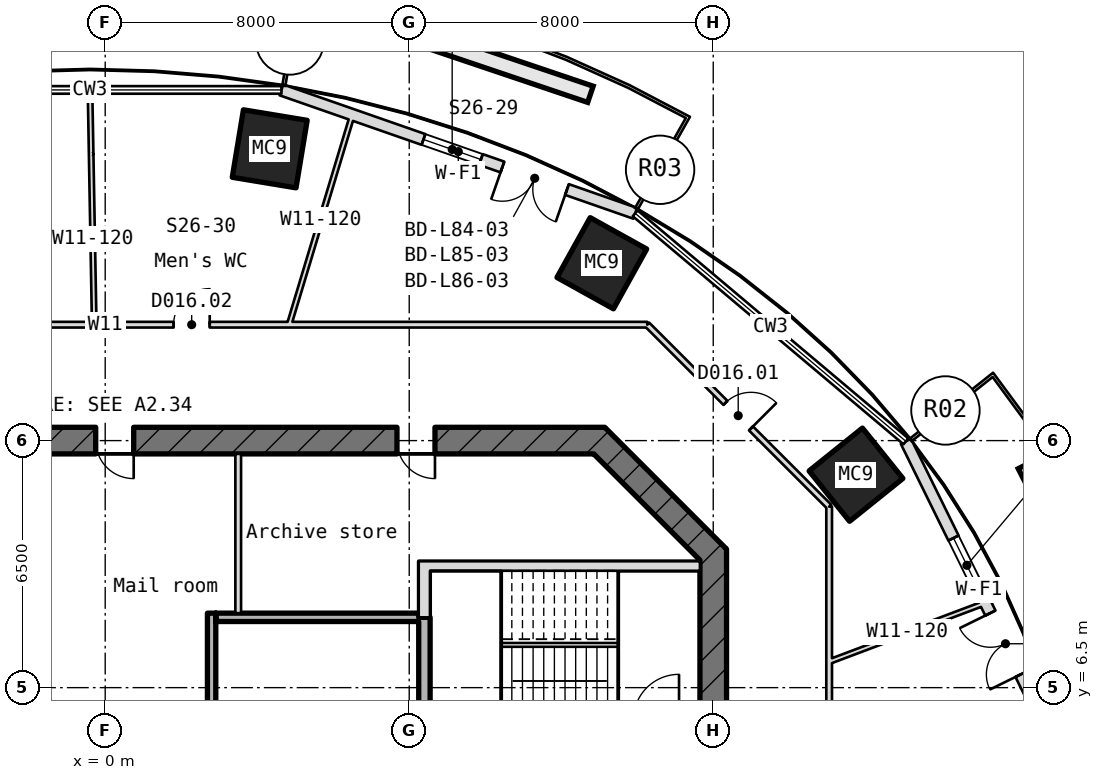
"""IFC4 building model, lengths in metres.
Left out: names, types, materials, properties, quantities, classifications, styles, units other than length and angle.
Written with IfcOpenShell. Run it as: python <this file> out.ifc"""

import sys

from ifc_helpers import new_model, si_unit, direction, frame, frame_2d, origin, origin_2d, place, context, subcontext, project, spatial, rectangle, hollow_rectangle, extrude, element, fill, save


model = new_model("IFC4")
c1 = context("Model", 3, precision=1e-05, world=origin(), true_north=direction((0.0, 1.0)))
c2 = subcontext(c1, "Body", "Model", "MODEL_VIEW")
j1 = project(units=[si_unit("LENGTHUNIT", "METRE"), si_unit("PLANEANGLEUNIT", "RADIAN")], contexts=[c1])
p1 = place(None, origin())
s1 = spatial("IfcSite", under=j1, at=p1, CompositionType="ELEMENT")
p2 = place(p1, origin())
s2 = spatial("IfcBuilding", under=s1, at=p2, CompositionType="ELEMENT")
p3 = place(p2, frame((0.0, 0.0, 371.65)))
s3 = spatial("IfcBuildingStorey", under=s2, at=p3, CompositionType="ELEMENT", Elevation=371.65)
for number, where, z_axis, x_axis in (
    (1, (19.757, 12.103, -0.18), (0.0, 0.0, 1.0), (0.626, -0.78, 0.0)),
    (2, (13.068, 17.667, -0.18), (0.0, 0.0, 1.0), (0.874, -0.486, 0.0)),
    (3, (4.329, 20.677, -0.18), (0.0, 0.0, 1.0), (0.987, -0.163, 0.0)),
):
    element("IfcColumn", number, at=place(p3, frame(where, z_axis=z_axis, x_axis=x_axis)), inside=s3, PredefinedType="COLUMN", context=c2, shape_type="SweptSolid", body=[
        extrude(hollow_rectangle(XDim=1.7, YDim=1.8, WallThickness=0.05, at=origin_2d()), origin(), (0.0, 0.0, 1.0), 4.15),
    ])
p4 = place(p3, frame((24.926, 5.142, 0.0), z_axis=(0.0, 0.0, 1.0), x_axis=(-0.441346217757, 0.897336902212, 0.0)))
e4 = element("IfcWall", 4, at=p4, inside=s3, PredefinedType="SOLIDWALL", context=c2, shape_type="SweptSolid", body=[
    extrude(rectangle(XDim=8.736, YDim=0.3, at=frame_2d((4.368, 0.0))), origin(), (0.0, 0.0, 1.0), 3.97),
])
p5 = place(p4, frame((1.9, 0.0, 0.0)))
e5 = element("IfcOpeningElement", 5, at=p5, cuts=e4, PredefinedType="OPENING", context=c2, shape_type="SweptSolid", body=[
    extrude(rectangle(XDim=1.8, YDim=2.4, at=frame_2d((0.9, 1.2))), frame((0.0, 0.16, 0.0), z_axis=(0.0, -1.0, 0.0), x_axis=(1.0, 0.0, 0.0)), (0.0, 0.0, 1.0), 0.32),
])
p6 = place(p4, frame((4.3, 0.0, 0.9)))
e6 = element("IfcOpeningElement", 6, at=p6, cuts=e4, PredefinedType="OPENING", context=c2, shape_type="SweptSolid", body=[
    extrude(rectangle(XDim=1.6, YDim=1.5, at=frame_2d((0.8, 0.75))), frame((0.0, 0.16, 0.0), z_axis=(0.0, -1.0, 0.0), x_axis=(1.0, 0.0, 0.0)), (0.0, 0.0, 1.0), 0.32),
])
p7 = place(p3, frame((13.946, 18.98, 0.0), z_axis=(0.0, 0.0, 1.0), x_axis=(-0.944198390312, 0.329377290855, 0.0)))
e7 = element("IfcWall", 7, at=p7, inside=s3, PredefinedType="SOLIDWALL", context=c2, shape_type="SweptSolid", body=[
    extrude(rectangle(XDim=9.858, YDim=0.3, at=frame_2d((4.929, 0.0))), origin(), (0.0, 0.0, 1.0), 3.97),
])
p8 = place(p7, frame((1.9, 0.0, 0.0)))
e8 = element("IfcOpeningElement", 8, at=p8, cuts=e7, PredefinedType="OPENING", context=c2, shape_type="SweptSolid", body=[
    extrude(rectangle(XDim=1.8, YDim=2.4, at=frame_2d((0.9, 1.2))), frame((0.0, 0.16, 0.0), z_axis=(0.0, -1.0, 0.0), x_axis=(1.0, 0.0, 0.0)), (0.0, 0.0, 1.0), 0.32),
])
p9 = place(p7, frame((4.3, 0.0, 0.9)))
e9 = element("IfcOpeningElement", 9, at=p9, cuts=e7, PredefinedType="OPENING", context=c2, shape_type="SweptSolid", body=[
    extrude(rectangle(XDim=1.6, YDim=1.5, at=frame_2d((0.8, 0.75))), frame((0.0, 0.16, 0.0), z_axis=(0.0, -1.0, 0.0), x_axis=(1.0, 0.0, 0.0)), (0.0, 0.0, 1.0), 0.32),
])
p10 = place(p3, frame((16.0, -10.145, -0.18), z_axis=(0.0, 0.0, 1.0), x_axis=(0.0, 1.0, 0.0)))
e10 = element("IfcWall", 10, at=p10, inside=s3, PredefinedType="SHEAR", context=c2, shape_type="SweptSolid", body=[
    extrude(rectangle(XDim=20.29, YDim=0.7, at=frame_2d((10.145, 0.0))), origin(), (0.0, 0.0, 1.0), 4.15),
])
p11 = place(p10, frame((8.945, 0.0, 0.18)))
e11 = element("IfcOpeningElement", 11, at=p11, cuts=e10, PredefinedType="OPENING", context=c2, shape_type="SweptSolid", body=[
    extrude(rectangle(XDim=2.4, YDim=2.1, at=frame_2d((1.2, 1.05))), frame((0.0, 0.36, 0.0), z_axis=(0.0, -1.0, 0.0), x_axis=(1.0, 0.0, 0.0)), (0.0, 0.0, 1.0), 0.72),
])
p12 = place(p10, frame((13.545, 0.0, 0.18)))
e12 = element("IfcOpeningElement", 12, at=p12, cuts=e10, PredefinedType="OPENING", context=c2, shape_type="SweptSolid", body=[
    extrude(rectangle(XDim=1.2, YDim=2.1, at=frame_2d((0.6, 1.05))), frame((0.0, 0.36, 0.0), z_axis=(0.0, -1.0, 0.0), x_axis=(1.0, 0.0, 0.0)), (0.0, 0.0, 1.0), 0.72),
])
p13 = place(p10, frame((3.545, 0.0, 0.18)))
e13 = element("IfcOpeningElement", 13, at=p13, cuts=e10, PredefinedType="OPENING", context=c2, shape_type="SweptSolid", body=[
    extrude(rectangle(XDim=1.2, YDim=2.1, at=frame_2d((0.6, 1.05))), frame((0.0, 0.36, 0.0), z_axis=(0.0, -1.0, 0.0), x_axis=(1.0, 0.0, 0.0)), (0.0, 0.0, 1.0), 0.72),
])
p14 = place(p3, frame((16.103, 9.897, -0.18), z_axis=(0.0, 0.0, 1.0), x_axis=(-0.707106781187, 0.707106781187, 0.0)))
e14 = element("IfcWall", 14, at=p14, inside=s3, PredefinedType="SHEAR", context=c2, shape_type="SweptSolid", body=[
    extrude(rectangle(XDim=4.533, YDim=0.7, at=frame_2d((2.266, 0.0))), origin(), (0.0, 0.0, 1.0), 4.15),
])
p15 = place(p3, frame((13.145, 13.0, -0.18), z_axis=(0.0, 0.0, 1.0), x_axis=(-1.0, 0.0, 0.0)))
e15 = element("IfcWall", 15, at=p15, inside=s3, PredefinedType="SHEAR", context=c2, shape_type="SweptSolid", body=[
    extrude(rectangle(XDim=26.29, YDim=0.7, at=frame_2d((13.145, 0.0))), origin(), (0.0, 0.0, 1.0), 4.15),
])
p16 = place(p15, frame((22.89, 0.0, 0.18)))
e16 = element("IfcOpeningElement", 16, at=p16, cuts=e15, PredefinedType="OPENING", context=c2, shape_type="SweptSolid", body=[
    extrude(rectangle(XDim=1.0, YDim=2.1, at=frame_2d((0.5, 1.05))), frame((0.0, 0.36, 0.0), z_axis=(0.0, -1.0, 0.0), x_axis=(1.0, 0.0, 0.0)), (0.0, 0.0, 1.0), 0.72),
])
p17 = place(p15, frame((18.895, 0.0, 0.18)))
e17 = element("IfcOpeningElement", 17, at=p17, cuts=e15, PredefinedType="OPENING", context=c2, shape_type="SweptSolid", body=[
    extrude(rectangle(XDim=1.0, YDim=2.1, at=frame_2d((0.5, 1.05))), frame((0.0, 0.36, 0.0), z_axis=(0.0, -1.0, 0.0), x_axis=(1.0, 0.0, 0.0)), (0.0, 0.0, 1.0), 0.72),
])
p18 = place(p15, frame((12.395, 0.0, 0.18)))
e18 = element("IfcOpeningElement", 18, at=p18, cuts=e15, PredefinedType="OPENING", context=c2, shape_type="SweptSolid", body=[
    extrude(rectangle(XDim=1.0, YDim=2.1, at=frame_2d((0.5, 1.05))), frame((0.0, 0.36, 0.0), z_axis=(0.0, -1.0, 0.0), x_axis=(1.0, 0.0, 0.0)), (0.0, 0.0, 1.0), 0.72),
])
p19 = place(p15, frame((4.467, 0.0, 0.18)))
e19 = element("IfcOpeningElement", 19, at=p19, cuts=e15, PredefinedType="OPENING", context=c2, shape_type="SweptSolid", body=[
    extrude(rectangle(XDim=1.0, YDim=2.1, at=frame_2d((0.5, 1.05))), frame((0.0, 0.36, 0.0), z_axis=(0.0, -1.0, 0.0), x_axis=(1.0, 0.0, 0.0)), (0.0, 0.0, 1.0), 0.72),
])
p20 = place(p3, frame((2.91, 8.35, 0.0), z_axis=(0.0, 0.0, 1.0), x_axis=(1.0, 0.0, 0.0)))
e20 = element("IfcWall", 20, at=p20, inside=s3, PredefinedType="STANDARD", context=c2, shape_type="SweptSolid", body=[
    extrude(rectangle(XDim=5.34, YDim=0.22, at=frame_2d((2.67, 0.0))), origin(), (0.0, 0.0, 1.0), 3.97),
])
p21 = place(p3, frame((8.55, 9.7, -0.18), z_axis=(0.0, 0.0, 1.0), x_axis=(1.0, 0.0, 0.0)))
e21 = element("IfcWall", 21, at=p21, inside=s3, PredefinedType="SHEAR", context=c2, shape_type="SweptSolid", body=[
    extrude(rectangle(XDim=7.1, YDim=0.25, at=frame_2d((3.55, 0.0))), origin(), (0.0, 0.0, 1.0), 4.15),
])
p22 = place(p3, frame((2.8, 5.46, 0.0), z_axis=(0.0, 0.0, 1.0), x_axis=(0.0, 1.0, 0.0)))
e22 = element("IfcWall", 22, at=p22, inside=s3, PredefinedType="STANDARD", context=c2, shape_type="SweptSolid", body=[
    extrude(rectangle(XDim=3.0, YDim=0.22, at=frame_2d((1.5, 0.0))), origin(), (0.0, 0.0, 1.0), 3.97),
])
p23 = place(p3, frame((3.5, 8.46, 0.0), z_axis=(0.0, 0.0, 1.0), x_axis=(0.0, 1.0, 0.0)))
e23 = element("IfcWall", 23, at=p23, inside=s3, PredefinedType="PARTITIONING", context=c2, shape_type="SweptSolid", body=[
    extrude(rectangle(XDim=4.19, YDim=0.15, at=frame_2d((2.095, 0.0))), origin(), (0.0, 0.0, 1.0), 3.97),
])
p24 = place(p3, frame((8.4, 2.5, -0.18), z_axis=(0.0, 0.0, 1.0), x_axis=(0.0, 1.0, 0.0)))
e24 = element("IfcWall", 24, at=p24, inside=s3, PredefinedType="SHEAR", context=c2, shape_type="SweptSolid", body=[
    extrude(rectangle(XDim=5.85, YDim=0.3, at=frame_2d((2.925, 0.0))), origin(), (0.0, 0.0, 1.0), 4.15),
])
p25 = place(p3, frame((8.4, 8.35, -0.18), z_axis=(0.0, 0.0, 1.0), x_axis=(0.0, 1.0, 0.0)))
e25 = element("IfcWall", 25, at=p25, inside=s3, PredefinedType="SHEAR", context=c2, shape_type="SweptSolid", body=[
    extrude(rectangle(XDim=1.475, YDim=0.3, at=frame_2d((0.737, 0.0))), origin(), (0.0, 0.0, 1.0), 4.15),
])
p26 = place(p3, frame((-14.263, 16.05, 0.0), z_axis=(0.0, 0.0, 1.0), x_axis=(1.0, 0.0, 0.0)))
e26 = element("IfcWall", 26, at=p26, inside=s3, PredefinedType="PARTITIONING", context=c2, shape_type="SweptSolid", body=[
    extrude(rectangle(XDim=28.527, YDim=0.15, at=frame_2d((14.263, 0.0))), origin(), (0.0, 0.0, 1.0), 3.97),
])
p27 = place(p26, frame((16.064, 0.0, 0.0)))
e27 = element("IfcOpeningElement", 27, at=p27, cuts=e26, PredefinedType="OPENING", context=c2, shape_type="SweptSolid", body=[
    extrude(rectangle(XDim=0.95, YDim=2.1, at=frame_2d((0.475, 1.05))), frame((0.0, 0.085, 0.0), z_axis=(0.0, -1.0, 0.0), x_axis=(1.0, 0.0, 0.0)), (0.0, 0.0, 1.0), 0.17),
])
p28 = place(p26, frame((10.107, 0.0, 0.0)))
e28 = element("IfcOpeningElement", 28, at=p28, cuts=e26, PredefinedType="OPENING", context=c2, shape_type="SweptSolid", body=[
    extrude(rectangle(XDim=0.95, YDim=2.1, at=frame_2d((0.475, 1.05))), frame((0.0, 0.085, 0.0), z_axis=(0.0, -1.0, 0.0), x_axis=(1.0, 0.0, 0.0)), (0.0, 0.0, 1.0), 0.17),
])
p29 = place(p26, frame((4.988, 0.0, 0.0)))
e29 = element("IfcOpeningElement", 29, at=p29, cuts=e26, PredefinedType="OPENING", context=c2, shape_type="SweptSolid", body=[
    extrude(rectangle(XDim=0.95, YDim=2.1, at=frame_2d((0.475, 1.05))), frame((0.0, 0.085, 0.0), z_axis=(0.0, -1.0, 0.0), x_axis=(1.0, 0.0, 0.0)), (0.0, 0.0, 1.0), 0.17),
])
p30 = place(p3, frame((-0.289, 16.05, 0.0), z_axis=(0.0, 0.0, 1.0), x_axis=(-0.01800089031, 0.999837970847, 0.0)))
e30 = element("IfcWall", 30, at=p30, inside=s3, PredefinedType="PARTITIONING", context=c2, shape_type="SweptSolid", body=[
    extrude(rectangle(XDim=4.489, YDim=0.12, at=frame_2d((2.245, 0.0))), origin(), (0.0, 0.0, 1.0), 3.617),
])
p31 = place(p3, frame((-0.37, 20.539, 0.0), z_axis=(0.0, 0.0, 1.0), x_axis=(-0.017923967001, 0.9998393528, 0.0)))
e31 = element("IfcWall", 31, at=p31, inside=s3, PredefinedType="PARTITIONING", context=c2, shape_type="SweptSolid", body=[
    extrude(rectangle(XDim=1.689, YDim=0.12, at=frame_2d((0.844, 0.0))), origin(), (0.0, 0.0, 1.0), 3.97),
])
p32 = place(p3, frame((4.84, 16.05, 0.0), z_axis=(0.0, 0.0, 1.0), x_axis=(0.288721483907, 0.957413131689, 0.0)))
e32 = element("IfcWall", 32, at=p32, inside=s3, PredefinedType="PARTITIONING", context=c2, shape_type="SweptSolid", body=[
    extrude(rectangle(XDim=5.771, YDim=0.12, at=frame_2d((2.886, 0.0))), origin(), (0.0, 0.0, 1.0), 3.97),
])
p33 = place(p3, frame((14.263, 16.05, 0.0), z_axis=(0.0, 0.0, 1.0), x_axis=(0.707106781187, -0.707106781187, 0.0)))
e33 = element("IfcWall", 33, at=p33, inside=s3, PredefinedType="PARTITIONING", context=c2, shape_type="SweptSolid", body=[
    extrude(rectangle(XDim=6.769, YDim=0.15, at=frame_2d((3.385, 0.0))), origin(), (0.0, 0.0, 1.0), 3.97),
])
p34 = place(p33, frame((2.91, 0.0, 0.0)))
e34 = element("IfcOpeningElement", 34, at=p34, cuts=e33, PredefinedType="OPENING", context=c2, shape_type="SweptSolid", body=[
    extrude(rectangle(XDim=0.95, YDim=2.1, at=frame_2d((0.475, 1.05))), frame((0.0, 0.085, 0.0), z_axis=(0.0, -1.0, 0.0), x_axis=(1.0, 0.0, 0.0)), (0.0, 0.0, 1.0), 0.17),
])
p35 = place(p3, frame((19.05, 7.182, 0.0), z_axis=(0.0, 0.0, 1.0), x_axis=(0.935715632494, 0.352755233989, 0.0)))
e35 = element("IfcWall", 35, at=p35, inside=s3, PredefinedType="PARTITIONING", context=c2, shape_type="SweptSolid", body=[
    extrude(rectangle(XDim=4.393, YDim=0.12, at=frame_2d((2.196, 0.0))), origin(), (0.0, 0.0, 1.0), 3.97),
])
p36 = place(p3, frame((19.05, 11.263, 0.0), z_axis=(0.0, 0.0, 1.0), x_axis=(0.0, -1.0, 0.0)))
e36 = element("IfcWall", 36, at=p36, inside=s3, PredefinedType="PARTITIONING", context=c2, shape_type="SweptSolid", body=[
    extrude(rectangle(XDim=20.929, YDim=0.15, at=frame_2d((10.465, 0.0))), origin(), (0.0, 0.0, 1.0), 3.97),
])
p37 = place(p36, frame((6.428, 0.0, 0.0)))
e37 = element("IfcOpeningElement", 37, at=p37, cuts=e36, PredefinedType="OPENING", context=c2, shape_type="SweptSolid", body=[
    extrude(rectangle(XDim=1.8, YDim=2.1, at=frame_2d((0.9, 1.05))), frame((0.0, 0.085, 0.0), z_axis=(0.0, -1.0, 0.0), x_axis=(1.0, 0.0, 0.0)), (0.0, 0.0, 1.0), 0.17),
])
p38 = place(p36, frame((13.186, 0.0, 0.0)))
e38 = element("IfcOpeningElement", 38, at=p38, cuts=e36, PredefinedType="OPENING", context=c2, shape_type="SweptSolid", body=[
    extrude(rectangle(XDim=1.8, YDim=2.1, at=frame_2d((0.9, 1.05))), frame((0.0, 0.085, 0.0), z_axis=(0.0, -1.0, 0.0), x_axis=(1.0, 0.0, 0.0)), (0.0, 0.0, 1.0), 0.17),
])
p39 = place(p5, origin())
e39 = element("IfcDoor", 39, at=p39, inside=s3, OperationType="SINGLE_SWING_LEFT", PredefinedType="DOOR", context=c2, shape_type="SweptSolid", body=[
    extrude(rectangle(XDim=1.8, YDim=2.4, at=frame_2d((0.9, 1.2))), frame((0.0, 0.025, 0.0), z_axis=(0.0, -1.0, 0.0), x_axis=(1.0, 0.0, 0.0)), (0.0, 0.0, 1.0), 0.05),
])
fill(e5, e39)
p40 = place(p6, origin())
e40 = element("IfcWindow", 40, at=p40, inside=s3, PartitioningType="SINGLE_PANEL", PredefinedType="WINDOW", context=c2, shape_type="SweptSolid", body=[
    extrude(rectangle(XDim=1.6, YDim=1.5, at=frame_2d((0.8, 0.75))), frame((0.0, 0.03, 0.0), z_axis=(0.0, -1.0, 0.0), x_axis=(1.0, 0.0, 0.0)), (0.0, 0.0, 1.0), 0.06),
])
fill(e6, e40)
p41 = place(p8, origin())
e41 = element("IfcDoor", 41, at=p41, inside=s3, OperationType="SINGLE_SWING_LEFT", PredefinedType="DOOR", context=c2, shape_type="SweptSolid", body=[
    extrude(rectangle(XDim=1.8, YDim=2.4, at=frame_2d((0.9, 1.2))), frame((0.0, 0.025, 0.0), z_axis=(0.0, -1.0, 0.0), x_axis=(1.0, 0.0, 0.0)), (0.0, 0.0, 1.0), 0.05),
])
fill(e8, e41)
p42 = place(p9, origin())
e42 = element("IfcWindow", 42, at=p42, inside=s3, PartitioningType="SINGLE_PANEL", PredefinedType="WINDOW", context=c2, shape_type="SweptSolid", body=[
    extrude(rectangle(XDim=1.6, YDim=1.5, at=frame_2d((0.8, 0.75))), frame((0.0, 0.03, 0.0), z_axis=(0.0, -1.0, 0.0), x_axis=(1.0, 0.0, 0.0)), (0.0, 0.0, 1.0), 0.06),
])
fill(e9, e42)
p43 = place(p18, origin())
e43 = element("IfcDoor", 43, at=p43, inside=s3, OperationType="SINGLE_SWING_RIGHT", PredefinedType="DOOR", context=c2, shape_type="SweptSolid", body=[
    extrude(rectangle(XDim=1.0, YDim=2.1, at=frame_2d((0.5, 1.05))), frame((0.0, 0.025, 0.0), z_axis=(0.0, -1.0, 0.0), x_axis=(1.0, 0.0, 0.0)), (0.0, 0.0, 1.0), 0.05),
])
fill(e18, e43)
p44 = place(p19, origin())
e44 = element("IfcDoor", 44, at=p44, inside=s3, OperationType="SINGLE_SWING_RIGHT", PredefinedType="DOOR", context=c2, shape_type="SweptSolid", body=[
    extrude(rectangle(XDim=1.0, YDim=2.1, at=frame_2d((0.5, 1.05))), frame((0.0, 0.025, 0.0), z_axis=(0.0, -1.0, 0.0), x_axis=(1.0, 0.0, 0.0)), (0.0, 0.0, 1.0), 0.05),
])
fill(e19, e44)
p45 = place(p34, origin())
e45 = element("IfcDoor", 45, at=p45, inside=s3, OperationType="SINGLE_SWING_RIGHT", PredefinedType="DOOR", context=c2, shape_type="SweptSolid", body=[
    extrude(rectangle(XDim=0.95, YDim=2.1, at=frame_2d((0.475, 1.05))), frame((0.0, 0.025, 0.0), z_axis=(0.0, -1.0, 0.0), x_axis=(1.0, 0.0, 0.0)), (0.0, 0.0, 1.0), 0.05),
])
fill(e34, e45)
p46 = place(p27, origin())
e46 = element("IfcDoor", 46, at=p46, inside=s3, OperationType="SINGLE_SWING_RIGHT", PredefinedType="DOOR", context=c2, shape_type="SweptSolid", body=[
    extrude(rectangle(XDim=0.95, YDim=2.1, at=frame_2d((0.475, 1.05))), frame((0.0, 0.025, 0.0), z_axis=(0.0, -1.0, 0.0), x_axis=(1.0, 0.0, 0.0)), (0.0, 0.0, 1.0), 0.05),
])
fill(e27, e46)
save(model, sys.argv[1])
